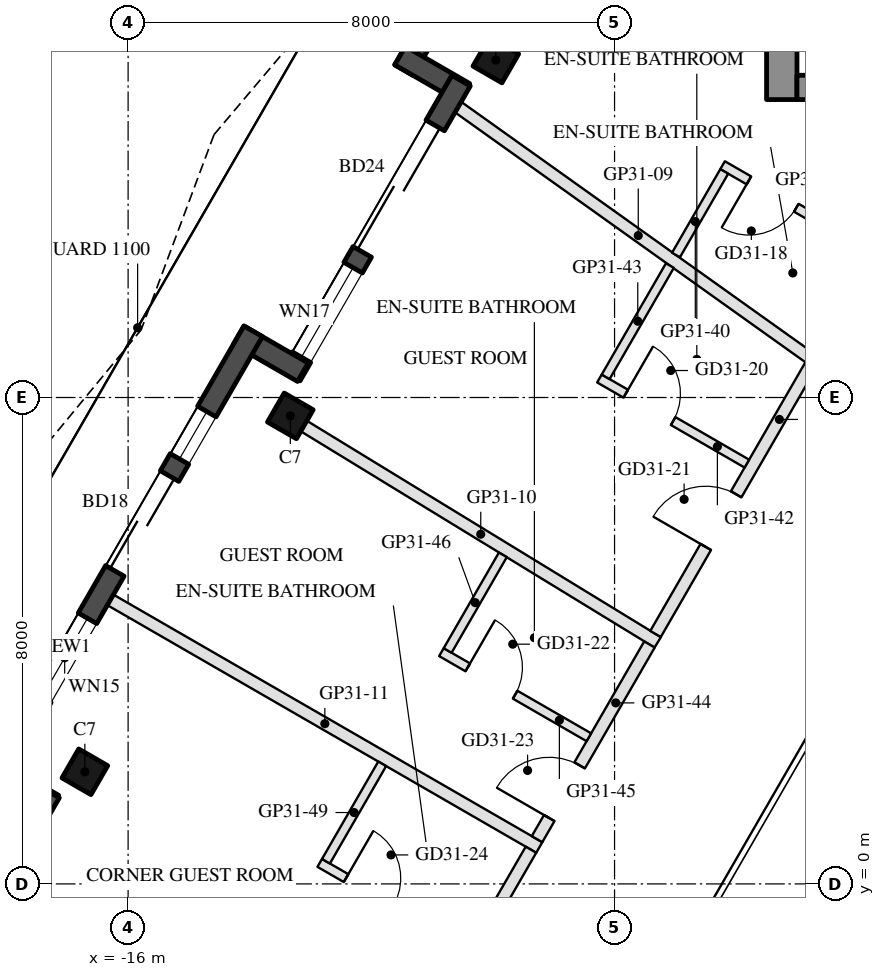
"""IFC4 building model, lengths in metres.
Left out: names, types, materials, properties, quantities, classifications, styles, units other than length and angle.
Written with IfcOpenShell. Run it as: python <this file> out.ifc"""

import sys

from ifc_helpers import new_model, si_unit, direction, frame, frame_2d, origin, origin_2d, place, context, subcontext, project, spatial, rectangle, hollow_rectangle, extrude, boolean, halfspace, element, fill, save


model = new_model("IFC4")
c1 = context("Model", 3, precision=1e-05, world=origin(), true_north=direction((0.0, 1.0)))
c2 = subcontext(c1, "Body", "Model", "MODEL_VIEW")
j1 = project(units=[si_unit("LENGTHUNIT", "METRE"), si_unit("PLANEANGLEUNIT", "RADIAN")], contexts=[c1])
p1 = place(None, origin())
s1 = spatial("IfcSite", under=j1, at=p1, CompositionType="ELEMENT")
p2 = place(p1, origin())
s2 = spatial("IfcBuilding", under=s1, at=p2, CompositionType="ELEMENT")
p3 = place(p2, frame((0.0, 0.0, 302.2)))
s3 = spatial("IfcBuildingStorey", under=s2, at=p3, CompositionType="ELEMENT", Elevation=302.2)
p4 = place(p3, frame((-9.953, 13.551, 0.0), z_axis=(0.0, 0.0, 1.0), x_axis=(0.5, 0.866025403784, 0.0)))
e1 = element("IfcColumn", 1, at=p4, inside=s3, PredefinedType="COLUMN", context=c2, shape_type="SweptSolid", body=[
    boolean("DIFFERENCE", extrude(hollow_rectangle(XDim=0.55, YDim=0.55, WallThickness=0.025, at=origin_2d()), origin(), (0.0, 0.0, 1.0), 3.7), halfspace(frame((0.0, 0.0, 0.034), z_axis=(0.0, 0.0, 1.0), x_axis=(1.0, 0.0, 0.0)), True)),
])
p5 = place(p3, frame((-13.332, 7.697, 0.0), z_axis=(0.0, 0.0, 1.0), x_axis=(0.5, 0.866025403784, 0.0)))
e2 = element("IfcColumn", 2, at=p5, inside=s3, PredefinedType="COLUMN", context=c2, shape_type="SweptSolid", body=[
    boolean("DIFFERENCE", extrude(hollow_rectangle(XDim=0.55, YDim=0.55, WallThickness=0.025, at=origin_2d()), origin(), (0.0, 0.0, 1.0), 3.7), halfspace(frame((0.0, 0.0, 0.031), z_axis=(0.0, 0.0, 1.0), x_axis=(1.0, 0.0, 0.0)), True)),
])
p6 = place(p3, frame((-16.711, 1.844, 0.0), z_axis=(0.0, 0.0, 1.0), x_axis=(0.5, 0.866025403784, 0.0)))
e3 = element("IfcColumn", 3, at=p6, inside=s3, PredefinedType="COLUMN", context=c2, shape_type="SweptSolid", body=[
    boolean("DIFFERENCE", extrude(hollow_rectangle(XDim=0.55, YDim=0.55, WallThickness=0.025, at=origin_2d()), origin(), (0.0, 0.0, 1.0), 3.7), halfspace(frame((0.0, 0.0, 0.034), z_axis=(0.0, 0.0, 1.0), x_axis=(1.0, 0.0, 0.0)), True)),
])
p7 = place(p3, frame((-6.344, 22.251, 0.0), z_axis=(0.0, 0.0, 1.0), x_axis=(-0.499983205548, -0.866035099848, 0.0)))
e4 = element("IfcWall", 4, at=p7, inside=s3, PredefinedType="SOLIDWALL", context=c2, shape_type="SweptSolid", body=[
    extrude(rectangle(XDim=10.239, YDim=0.35, at=frame_2d((5.12, 0.0))), origin(), (0.0, 0.0, 1.0), 3.55),
])
p8 = place(p7, frame((0.381, 0.0, 0.3)))
e5 = element("IfcOpeningElement", 5, at=p8, cuts=e4, PredefinedType="OPENING", context=c2, shape_type="SweptSolid", body=[
    extrude(rectangle(XDim=1.5, YDim=2.65, at=frame_2d((0.75, 1.325))), frame((0.0, 0.185, 0.0), z_axis=(0.0, -1.0, 0.0), x_axis=(1.0, 0.0, 0.0)), (0.0, 0.0, 1.0), 0.37),
])
p9 = place(p7, frame((6.314, 0.0, 0.0)))
e6 = element("IfcOpeningElement", 6, at=p9, cuts=e4, PredefinedType="OPENING", context=c2, shape_type="SweptSolid", body=[
    extrude(rectangle(XDim=2.4, YDim=2.4, at=frame_2d((1.2, 1.2))), frame((0.0, 0.185, 0.0), z_axis=(0.0, -1.0, 0.0), x_axis=(1.0, 0.0, 0.0)), (0.0, 0.0, 1.0), 0.37),
])
p10 = place(p7, frame((3.205, 0.0, 0.3)))
e7 = element("IfcOpeningElement", 7, at=p10, cuts=e4, PredefinedType="OPENING", context=c2, shape_type="SweptSolid", body=[
    extrude(rectangle(XDim=2.8, YDim=2.65, at=frame_2d((1.4, 1.325))), frame((0.0, 0.185, 0.0), z_axis=(0.0, -1.0, 0.0), x_axis=(1.0, 0.0, 0.0)), (0.0, 0.0, 1.0), 0.37),
])
p11 = place(p3, frame((-11.528, 13.623, 0.0), z_axis=(0.0, 0.0, 1.0), x_axis=(0.866005645448, -0.500034220881, 0.0)))
e8 = element("IfcWall", 8, at=p11, inside=s3, PredefinedType="SOLIDWALL", context=c2, shape_type="SweptSolid", body=[
    extrude(rectangle(XDim=1.22, YDim=0.35, at=frame_2d((0.61, 0.0))), origin(), (0.0, 0.0, 1.0), 3.55),
])
p12 = place(p3, frame((-10.524, 13.211, 0.0), z_axis=(0.0, 0.0, 1.0), x_axis=(-0.500008054862, -0.866020753258, 0.0)))
e9 = element("IfcWall", 9, at=p12, inside=s3, PredefinedType="SOLIDWALL", context=c2, shape_type="SweptSolid", body=[
    extrude(rectangle(XDim=5.599, YDim=0.35, at=frame_2d((2.8, 0.0))), origin(), (0.0, 0.0, 1.0), 3.55),
])
p13 = place(p12, frame((0.851, 0.0, 0.0)))
e10 = element("IfcOpeningElement", 10, at=p13, cuts=e9, PredefinedType="OPENING", context=c2, shape_type="SweptSolid", body=[
    extrude(rectangle(XDim=2.4, YDim=2.4, at=frame_2d((1.2, 1.2))), frame((0.0, 0.185, 0.0), z_axis=(0.0, -1.0, 0.0), x_axis=(1.0, 0.0, 0.0)), (0.0, 0.0, 1.0), 0.37),
])
p14 = place(p12, frame((3.551, 0.0, 0.3)))
e11 = element("IfcOpeningElement", 11, at=p14, cuts=e9, PredefinedType="OPENING", context=c2, shape_type="SweptSolid", body=[
    extrude(rectangle(XDim=1.7, YDim=2.65, at=frame_2d((0.85, 1.325))), frame((0.0, 0.185, 0.0), z_axis=(0.0, -1.0, 0.0), x_axis=(1.0, 0.0, 0.0)), (0.0, 0.0, 1.0), 0.37),
])
p15 = place(p3, frame((-13.125, 8.415, 0.0), z_axis=(0.0, 0.0, 1.0), x_axis=(-0.865955602162, 0.500120880472, 0.0)))
e12 = element("IfcWall", 12, at=p15, inside=s3, PredefinedType="SOLIDWALL", context=c2, shape_type="SweptSolid", body=[
    extrude(rectangle(XDim=1.22, YDim=0.35, at=frame_2d((0.61, 0.0))), origin(), (0.0, 0.0, 1.0), 3.55),
])
p16 = place(p3, frame((-13.943, 9.089, 0.0), z_axis=(0.0, 0.0, 1.0), x_axis=(-0.500013816581, -0.866017426631, 0.0)))
e13 = element("IfcWall", 13, at=p16, inside=s3, PredefinedType="SOLIDWALL", context=c2, shape_type="SweptSolid", body=[
    extrude(rectangle(XDim=8.559, YDim=0.35, at=frame_2d((4.279, 0.0))), origin(), (0.0, 0.0, 1.0), 3.55),
])
p17 = place(p16, frame((2.75, 0.0, 0.0)))
e14 = element("IfcOpeningElement", 14, at=p17, cuts=e13, PredefinedType="OPENING", context=c2, shape_type="SweptSolid", body=[
    extrude(rectangle(XDim=1.8, YDim=2.4, at=frame_2d((0.9, 1.2))), frame((0.0, 0.185, 0.0), z_axis=(0.0, -1.0, 0.0), x_axis=(1.0, 0.0, 0.0)), (0.0, 0.0, 1.0), 0.37),
])
p18 = place(p16, frame((1.525, 0.0, 0.3)))
e15 = element("IfcOpeningElement", 15, at=p18, cuts=e13, PredefinedType="OPENING", context=c2, shape_type="SweptSolid", body=[
    extrude(rectangle(XDim=0.9, YDim=2.65, at=frame_2d((0.45, 1.325))), frame((0.0, 0.185, 0.0), z_axis=(0.0, -1.0, 0.0), x_axis=(1.0, 0.0, 0.0)), (0.0, 0.0, 1.0), 0.37),
])
p19 = place(p16, frame((5.45, 0.0, 0.3)))
e16 = element("IfcOpeningElement", 16, at=p19, cuts=e13, PredefinedType="OPENING", context=c2, shape_type="SweptSolid", body=[
    extrude(rectangle(XDim=1.5, YDim=2.65, at=frame_2d((0.75, 1.325))), frame((0.0, 0.185, 0.0), z_axis=(0.0, -1.0, 0.0), x_axis=(1.0, 0.0, 0.0)), (0.0, 0.0, 1.0), 0.37),
])
p20 = place(p3, frame((-18.287, 1.916, 0.0), z_axis=(0.0, 0.0, 1.0), x_axis=(0.866142280446, -0.499797509021, 0.0)))
e17 = element("IfcWall", 17, at=p20, inside=s3, PredefinedType="SOLIDWALL", context=c2, shape_type="SweptSolid", body=[
    extrude(rectangle(XDim=1.22, YDim=0.35, at=frame_2d((0.61, 0.0))), origin(), (0.0, 0.0, 1.0), 3.55),
])
p21 = place(p3, frame((-17.283, 1.504, 0.0), z_axis=(0.0, 0.0, 1.0), x_axis=(-0.500008054862, -0.866020753258, 0.0)))
e18 = element("IfcWall", 18, at=p21, inside=s3, PredefinedType="SOLIDWALL", context=c2, shape_type="SweptSolid", body=[
    extrude(rectangle(XDim=5.599, YDim=0.35, at=frame_2d((2.8, 0.0))), origin(), (0.0, 0.0, 1.0), 3.55),
])
p22 = place(p21, frame((0.77, 0.0, 0.0)))
e19 = element("IfcOpeningElement", 19, at=p22, cuts=e18, PredefinedType="OPENING", context=c2, shape_type="SweptSolid", body=[
    extrude(rectangle(XDim=2.4, YDim=2.4, at=frame_2d((1.2, 1.2))), frame((0.0, 0.185, 0.0), z_axis=(0.0, -1.0, 0.0), x_axis=(1.0, 0.0, 0.0)), (0.0, 0.0, 1.0), 0.37),
])
p23 = place(p21, frame((3.47, 0.0, 0.3)))
e20 = element("IfcOpeningElement", 20, at=p23, cuts=e18, PredefinedType="OPENING", context=c2, shape_type="SweptSolid", body=[
    extrude(rectangle(XDim=1.8, YDim=2.65, at=frame_2d((0.9, 1.325))), frame((0.0, 0.185, 0.0), z_axis=(0.0, -1.0, 0.0), x_axis=(1.0, 0.0, 0.0)), (0.0, 0.0, 1.0), 0.37),
])
p24 = place(p3, frame((-5.25, 12.9, 0.0), z_axis=(0.0, 0.0, 1.0), x_axis=(0.0, 1.0, 0.0)))
e21 = element("IfcWall", 21, at=p24, inside=s3, PredefinedType="SHEAR", context=c2, shape_type="SweptSolid", body=[
    extrude(rectangle(XDim=10.299, YDim=0.5, at=frame_2d((5.149, 0.0))), origin(), (0.0, 0.0, 1.0), 3.5),
])
p25 = place(p3, frame((5.0, 13.1, 0.0), z_axis=(0.0, 0.0, 1.0), x_axis=(-1.0, 0.0, 0.0)))
e22 = element("IfcWall", 22, at=p25, inside=s3, PredefinedType="SHEAR", context=c2, shape_type="SweptSolid", body=[
    extrude(rectangle(XDim=10.0, YDim=0.4, at=frame_2d((5.0, 0.0))), origin(), (0.0, 0.0, 1.0), 3.5),
])
p26 = place(p25, frame((3.55, 0.0, 0.0)))
e23 = element("IfcOpeningElement", 23, at=p26, cuts=e22, PredefinedType="OPENING", context=c2, shape_type="SweptSolid", body=[
    extrude(rectangle(XDim=1.1, YDim=2.1, at=frame_2d((0.55, 1.05))), frame((0.0, 0.21, 0.0), z_axis=(0.0, -1.0, 0.0), x_axis=(1.0, 0.0, 0.0)), (0.0, 0.0, 1.0), 0.42),
])
p27 = place(p25, frame((5.85, 0.0, 0.0)))
e24 = element("IfcOpeningElement", 24, at=p27, cuts=e22, PredefinedType="OPENING", context=c2, shape_type="SweptSolid", body=[
    extrude(rectangle(XDim=1.4, YDim=2.1, at=frame_2d((0.7, 1.05))), frame((0.0, 0.21, 0.0), z_axis=(0.0, -1.0, 0.0), x_axis=(1.0, 0.0, 0.0)), (0.0, 0.0, 1.0), 0.42),
])
p28 = place(p3, frame((-10.573, 12.776, 0.0), z_axis=(0.0, 0.0, 1.0), x_axis=(0.814114082564, -0.580704968613, 0.0)))
e25 = element("IfcWall", 25, at=p28, inside=s3, PredefinedType="PARTITIONING", context=c2, shape_type="SweptSolid", body=[
    extrude(rectangle(XDim=7.278, YDim=0.2, at=frame_2d((3.639, 0.0))), origin(), (0.0, 0.0, 1.0), 3.16),
])
p29 = place(p3, frame((-13.111, 7.531, 0.0), z_axis=(0.0, 0.0, 1.0), x_axis=(0.853158842711, -0.521651214034, 0.0)))
e26 = element("IfcWall", 26, at=p29, inside=s3, PredefinedType="PARTITIONING", context=c2, shape_type="SweptSolid", body=[
    extrude(rectangle(XDim=6.822, YDim=0.2, at=frame_2d((3.411, 0.0))), origin(), (0.0, 0.0, 1.0), 3.1),
])
p30 = place(p3, frame((-16.292, 4.672, 0.0), z_axis=(0.0, 0.0, 1.0), x_axis=(0.866028345359, -0.499994905008, 0.0)))
e27 = element("IfcWall", 27, at=p30, inside=s3, PredefinedType="PARTITIONING", context=c2, shape_type="SweptSolid", body=[
    extrude(rectangle(XDim=8.145, YDim=0.2, at=frame_2d((4.072, 0.0))), origin(), (0.0, 0.0, 1.0), 3.16),
])
p31 = place(p3, frame((-3.799, 10.421, 0.0), z_axis=(0.0, 0.0, 1.0), x_axis=(-0.866034573852, 0.49998411664, 0.0)))
e28 = element("IfcWall", 28, at=p31, inside=s3, PredefinedType="PARTITIONING", context=c2, shape_type="SweptSolid", body=[
    extrude(rectangle(XDim=2.8, YDim=0.15, at=frame_2d((1.4, 0.0))), origin(), (0.0, 0.0, 1.0), 3.55),
])
p32 = place(p31, frame((1.4, 0.0, 0.0)))
e29 = element("IfcOpeningElement", 29, at=p32, cuts=e28, PredefinedType="OPENING", context=c2, shape_type="SweptSolid", body=[
    extrude(rectangle(XDim=0.9, YDim=2.1, at=frame_2d((0.45, 1.05))), frame((0.0, 0.085, 0.0), z_axis=(0.0, -1.0, 0.0), x_axis=(1.0, 0.0, 0.0)), (0.0, 0.0, 1.0), 0.17),
])
p33 = place(p3, frame((-6.196, 11.719, 0.0), z_axis=(0.0, 0.0, 1.0), x_axis=(-0.500041894521, -0.86600121462, 0.0)))
e30 = element("IfcWall", 30, at=p33, inside=s3, PredefinedType="PARTITIONING", context=c2, shape_type="SweptSolid", body=[
    extrude(rectangle(XDim=1.588, YDim=0.15, at=frame_2d((0.794, 0.0))), origin(), (0.0, 0.0, 1.0), 3.1),
])
p34 = place(p3, frame((-7.326, 4.111, 0.0), z_axis=(0.0, 0.0, 1.0), x_axis=(0.499970062876, 0.866042687301, 0.0)))
e31 = element("IfcWall", 31, at=p34, inside=s3, PredefinedType="PARTITIONING", context=c2, shape_type="SweptSolid", body=[
    extrude(rectangle(XDim=5.093, YDim=0.2, at=frame_2d((2.546, 0.0))), origin(), (0.0, 0.0, 1.0), 3.1),
])
p35 = place(p34, frame((1.652, 0.0, 0.0)))
e32 = element("IfcOpeningElement", 32, at=p35, cuts=e31, PredefinedType="OPENING", context=c2, shape_type="SweptSolid", body=[
    extrude(rectangle(XDim=1.0, YDim=2.1, at=frame_2d((0.5, 1.05))), frame((0.0, 0.11, 0.0), z_axis=(0.0, -1.0, 0.0), x_axis=(1.0, 0.0, 0.0)), (0.0, 0.0, 1.0), 0.22),
])
p36 = place(p3, frame((-8.249, 8.312, 0.0), z_axis=(0.0, 0.0, 1.0), x_axis=(0.866034573852, -0.49998411664, 0.0)))
e33 = element("IfcWall", 33, at=p36, inside=s3, PredefinedType="PARTITIONING", context=c2, shape_type="SweptSolid", body=[
    extrude(rectangle(XDim=2.8, YDim=0.15, at=frame_2d((1.4, 0.0))), origin(), (0.0, 0.0, 1.0), 3.55),
])
p37 = place(p36, frame((0.5, 0.0, 0.0)))
e34 = element("IfcOpeningElement", 34, at=p37, cuts=e33, PredefinedType="OPENING", context=c2, shape_type="SweptSolid", body=[
    extrude(rectangle(XDim=0.9, YDim=2.1, at=frame_2d((0.45, 1.05))), frame((0.0, 0.085, 0.0), z_axis=(0.0, -1.0, 0.0), x_axis=(1.0, 0.0, 0.0)), (0.0, 0.0, 1.0), 0.17),
])
p38 = place(p3, frame((-7.09, 10.169, 0.0), z_axis=(0.0, 0.0, 1.0), x_axis=(-0.500079259916, -0.865979638214, 0.0)))
e35 = element("IfcWall", 35, at=p38, inside=s3, PredefinedType="PARTITIONING", context=c2, shape_type="SweptSolid", body=[
    extrude(rectangle(XDim=2.113, YDim=0.15, at=frame_2d((1.056, 0.0))), origin(), (0.0, 0.0, 1.0), 3.1),
])
p39 = place(p3, frame((-9.275, 0.736, 0.0), z_axis=(0.0, 0.0, 1.0), x_axis=(0.50002346599, 0.866011855265, 0.0)))
e36 = element("IfcWall", 36, at=p39, inside=s3, PredefinedType="PARTITIONING", context=c2, shape_type="SweptSolid", body=[
    extrude(rectangle(XDim=3.698, YDim=0.2, at=frame_2d((1.849, 0.0))), origin(), (0.0, 0.0, 1.0), 3.1),
])
p40 = place(p39, frame((0.401, 0.0, 0.0)))
e37 = element("IfcOpeningElement", 37, at=p40, cuts=e36, PredefinedType="OPENING", context=c2, shape_type="SweptSolid", body=[
    extrude(rectangle(XDim=1.0, YDim=2.1, at=frame_2d((0.5, 1.05))), frame((0.0, 0.11, 0.0), z_axis=(0.0, -1.0, 0.0), x_axis=(1.0, 0.0, 0.0)), (0.0, 0.0, 1.0), 0.22),
])
p41 = place(p3, frame((-10.847, 3.812, 0.0), z_axis=(0.0, 0.0, 1.0), x_axis=(0.865996816683, -0.500049511043, 0.0)))
e38 = element("IfcWall", 38, at=p41, inside=s3, PredefinedType="PARTITIONING", context=c2, shape_type="SweptSolid", body=[
    extrude(rectangle(XDim=2.8, YDim=0.15, at=frame_2d((1.4, 0.0))), origin(), (0.0, 0.0, 1.0), 3.55),
])
p42 = place(p41, frame((0.5, 0.0, 0.0)))
e39 = element("IfcOpeningElement", 39, at=p42, cuts=e38, PredefinedType="OPENING", context=c2, shape_type="SweptSolid", body=[
    extrude(rectangle(XDim=0.9, YDim=2.1, at=frame_2d((0.45, 1.05))), frame((0.0, 0.085, 0.0), z_axis=(0.0, -1.0, 0.0), x_axis=(1.0, 0.0, 0.0)), (0.0, 0.0, 1.0), 0.17),
])
p43 = place(p3, frame((-9.837, 5.412, 0.0), z_axis=(0.0, 0.0, 1.0), x_axis=(-0.499970715924, -0.866042310294, 0.0)))
e40 = element("IfcWall", 40, at=p43, inside=s3, PredefinedType="PARTITIONING", context=c2, shape_type="SweptSolid", body=[
    extrude(rectangle(XDim=1.816, YDim=0.15, at=frame_2d((0.908, 0.0))), origin(), (0.0, 0.0, 1.0), 3.55),
])
p44 = place(p3, frame((-12.269, -4.45, 0.0), z_axis=(0.0, 0.0, 1.0), x_axis=(0.50002670742, 0.866009983699, 0.0)))
e41 = element("IfcWall", 41, at=p44, inside=s3, PredefinedType="PARTITIONING", context=c2, shape_type="SweptSolid", body=[
    extrude(rectangle(XDim=5.788, YDim=0.2, at=frame_2d((2.894, 0.0))), origin(), (0.0, 0.0, 1.0), 3.1),
])
p45 = place(p44, frame((2.338, 0.0, 0.0)))
e42 = element("IfcOpeningElement", 42, at=p45, cuts=e41, PredefinedType="OPENING", context=c2, shape_type="SweptSolid", body=[
    extrude(rectangle(XDim=1.0, YDim=2.1, at=frame_2d((0.5, 1.05))), frame((0.0, 0.11, 0.0), z_axis=(0.0, -1.0, 0.0), x_axis=(1.0, 0.0, 0.0)), (0.0, 0.0, 1.0), 0.22),
])
p46 = place(p3, frame((-12.849, 0.346, 0.0), z_axis=(0.0, 0.0, 1.0), x_axis=(0.866018616679, -0.500011755427, 0.0)))
e43 = element("IfcWall", 43, at=p46, inside=s3, PredefinedType="PARTITIONING", context=c2, shape_type="SweptSolid", body=[
    extrude(rectangle(XDim=2.8, YDim=0.15, at=frame_2d((1.4, 0.0))), origin(), (0.0, 0.0, 1.0), 3.55),
])
p47 = place(p46, frame((0.5, 0.0, 0.0)))
e44 = element("IfcOpeningElement", 44, at=p47, cuts=e43, PredefinedType="OPENING", context=c2, shape_type="SweptSolid", body=[
    extrude(rectangle(XDim=0.9, YDim=2.1, at=frame_2d((0.45, 1.05))), frame((0.0, 0.085, 0.0), z_axis=(0.0, -1.0, 0.0), x_axis=(1.0, 0.0, 0.0)), (0.0, 0.0, 1.0), 0.17),
])
p48 = place(p3, frame((-11.821, 1.975, 0.0), z_axis=(0.0, 0.0, 1.0), x_axis=(-0.500042316284, -0.866000971088, 0.0)))
e45 = element("IfcWall", 45, at=p48, inside=s3, PredefinedType="PARTITIONING", context=c2, shape_type="SweptSolid", body=[
    extrude(rectangle(XDim=1.85, YDim=0.15, at=frame_2d((0.925, 0.0))), origin(), (0.0, 0.0, 1.0), 3.55),
])
p49 = place(p13, frame((2.4, 0.0, 0.0), z_axis=(0.0, 0.0, 1.0), x_axis=(-1.0, 0.0, 0.0)))
e46 = element("IfcDoor", 46, at=p49, inside=s3, OperationType="SLIDING_TO_LEFT", PredefinedType="DOOR", context=c2, shape_type="SweptSolid", body=[
    extrude(rectangle(XDim=2.4, YDim=2.4, at=frame_2d((1.2, 1.2))), frame((0.0, 0.025, 0.0), z_axis=(0.0, -1.0, 0.0), x_axis=(1.0, 0.0, 0.0)), (0.0, 0.0, 1.0), 0.05),
])
fill(e10, e46)
p50 = place(p14, origin())
e47 = element("IfcWindow", 47, at=p50, inside=s3, PartitioningType="SINGLE_PANEL", PredefinedType="WINDOW", context=c2, shape_type="SweptSolid", body=[
    extrude(rectangle(XDim=1.7, YDim=2.65, at=frame_2d((0.85, 1.325))), frame((0.0, 0.03, 0.0), z_axis=(0.0, -1.0, 0.0), x_axis=(1.0, 0.0, 0.0)), (0.0, 0.0, 1.0), 0.06),
])
fill(e11, e47)
p51 = place(p17, frame((1.8, 0.0, 0.0), z_axis=(0.0, 0.0, 1.0), x_axis=(-1.0, 0.0, 0.0)))
e48 = element("IfcDoor", 48, at=p51, inside=s3, OperationType="SLIDING_TO_LEFT", PredefinedType="DOOR", context=c2, shape_type="SweptSolid", body=[
    extrude(rectangle(XDim=1.8, YDim=2.4, at=frame_2d((0.9, 1.2))), frame((0.0, 0.025, 0.0), z_axis=(0.0, -1.0, 0.0), x_axis=(1.0, 0.0, 0.0)), (0.0, 0.0, 1.0), 0.05),
])
fill(e14, e48)
p52 = place(p18, origin())
e49 = element("IfcWindow", 49, at=p52, inside=s3, PartitioningType="SINGLE_PANEL", PredefinedType="WINDOW", context=c2, shape_type="SweptSolid", body=[
    extrude(rectangle(XDim=0.9, YDim=2.65, at=frame_2d((0.45, 1.325))), frame((0.0, 0.03, 0.0), z_axis=(0.0, -1.0, 0.0), x_axis=(1.0, 0.0, 0.0)), (0.0, 0.0, 1.0), 0.06),
])
fill(e15, e49)
p53 = place(p19, origin())
e50 = element("IfcWindow", 50, at=p53, inside=s3, PartitioningType="SINGLE_PANEL", PredefinedType="WINDOW", context=c2, shape_type="SweptSolid", body=[
    extrude(rectangle(XDim=1.5, YDim=2.65, at=frame_2d((0.75, 1.325))), frame((0.0, 0.03, 0.0), z_axis=(0.0, -1.0, 0.0), x_axis=(1.0, 0.0, 0.0)), (0.0, 0.0, 1.0), 0.06),
])
fill(e16, e50)
p54 = place(p32, origin())
e51 = element("IfcDoor", 51, at=p54, inside=s3, OperationType="SINGLE_SWING_RIGHT", PredefinedType="DOOR", context=c2, shape_type="SweptSolid", body=[
    extrude(rectangle(XDim=0.9, YDim=2.1, at=frame_2d((0.45, 1.05))), frame((0.0, 0.025, 0.0), z_axis=(0.0, -1.0, 0.0), x_axis=(1.0, 0.0, 0.0)), (0.0, 0.0, 1.0), 0.05),
])
fill(e29, e51)
p55 = place(p37, origin())
e52 = element("IfcDoor", 52, at=p55, inside=s3, OperationType="SINGLE_SWING_LEFT", PredefinedType="DOOR", context=c2, shape_type="SweptSolid", body=[
    extrude(rectangle(XDim=0.9, YDim=2.1, at=frame_2d((0.45, 1.05))), frame((0.0, 0.025, 0.0), z_axis=(0.0, -1.0, 0.0), x_axis=(1.0, 0.0, 0.0)), (0.0, 0.0, 1.0), 0.05),
])
fill(e34, e52)
p56 = place(p35, origin())
e53 = element("IfcDoor", 53, at=p56, inside=s3, OperationType="SINGLE_SWING_LEFT", PredefinedType="DOOR", context=c2, shape_type="SweptSolid", body=[
    extrude(rectangle(XDim=1.0, YDim=2.1, at=frame_2d((0.5, 1.05))), frame((0.0, 0.025, 0.0), z_axis=(0.0, -1.0, 0.0), x_axis=(1.0, 0.0, 0.0)), (0.0, 0.0, 1.0), 0.05),
])
fill(e32, e53)
p57 = place(p42, origin())
e54 = element("IfcDoor", 54, at=p57, inside=s3, OperationType="SINGLE_SWING_LEFT", PredefinedType="DOOR", context=c2, shape_type="SweptSolid", body=[
    extrude(rectangle(XDim=0.9, YDim=2.1, at=frame_2d((0.45, 1.05))), frame((0.0, 0.025, 0.0), z_axis=(0.0, -1.0, 0.0), x_axis=(1.0, 0.0, 0.0)), (0.0, 0.0, 1.0), 0.05),
])
fill(e39, e54)
p58 = place(p40, origin())
e55 = element("IfcDoor", 55, at=p58, inside=s3, OperationType="SINGLE_SWING_LEFT", PredefinedType="DOOR", context=c2, shape_type="SweptSolid", body=[
    extrude(rectangle(XDim=1.0, YDim=2.1, at=frame_2d((0.5, 1.05))), frame((0.0, 0.025, 0.0), z_axis=(0.0, -1.0, 0.0), x_axis=(1.0, 0.0, 0.0)), (0.0, 0.0, 1.0), 0.05),
])
fill(e37, e55)
p59 = place(p47, origin())
e56 = element("IfcDoor", 56, at=p59, inside=s3, OperationType="SINGLE_SWING_LEFT", PredefinedType="DOOR", context=c2, shape_type="SweptSolid", body=[
    extrude(rectangle(XDim=0.9, YDim=2.1, at=frame_2d((0.45, 1.05))), frame((0.0, 0.025, 0.0), z_axis=(0.0, -1.0, 0.0), x_axis=(1.0, 0.0, 0.0)), (0.0, 0.0, 1.0), 0.05),
])
fill(e44, e56)
save(model, sys.argv[1])
